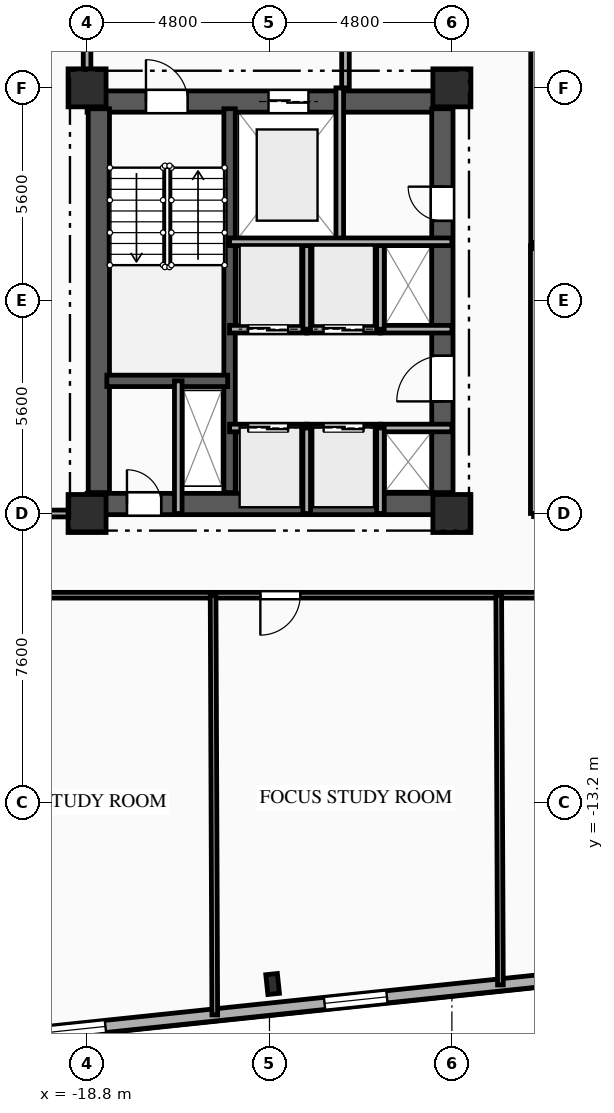
"""IFC4 building model, lengths in metres.
Left out: names, types, materials, properties, quantities, classifications, styles, units other than length and angle.
Written with IfcOpenShell. Run it as: python <this file> out.ifc"""

import sys

from ifc_helpers import new_model, si_unit, direction, frame, frame_2d, origin, origin_2d, place, context, subcontext, project, spatial, rectangle, i_section, extrude, element, fill, save


model = new_model("IFC4")
c1 = context("Model", 3, precision=1e-05, world=origin(), true_north=direction((0.0, 1.0)))
c2 = subcontext(c1, "Body", "Model", "MODEL_VIEW")
j1 = project(units=[si_unit("LENGTHUNIT", "METRE"), si_unit("PLANEANGLEUNIT", "RADIAN")], contexts=[c1])
p1 = place(None, origin())
s1 = spatial("IfcSite", under=j1, at=p1, CompositionType="ELEMENT")
p2 = place(p1, origin())
s2 = spatial("IfcBuilding", under=s1, at=p2, CompositionType="ELEMENT")
p3 = place(p2, frame((0.0, 0.0, 95.75)))
s3 = spatial("IfcBuildingStorey", under=s2, at=p3, CompositionType="ELEMENT", Elevation=95.75)
for number, where, z_axis, x_axis in (
    (1, (-18.8, -5.6, 0.0), (0.0, 0.0, 1.0), (1.0, 0.0, 0.0)),
    (2, (-18.8, 5.6, 0.0), (0.0, 0.0, 1.0), (1.0, 0.0, 0.0)),
    (3, (-9.2, -5.6, 0.0), (0.0, 0.0, 1.0), (1.0, 0.0, 0.0)),
    (4, (-9.2, 5.6, 0.0), (0.0, 0.0, 1.0), (1.0, 0.0, 0.0)),
):
    element("IfcColumn", number, at=place(p3, frame(where, z_axis=z_axis, x_axis=x_axis)), inside=s3, PredefinedType="COLUMN", context=c2, shape_type="SweptSolid", body=[
        extrude(rectangle(XDim=1.0, YDim=1.0, at=origin_2d()), origin(), (0.0, 0.0, 1.0), 3.35),
    ])
p4 = place(p3, frame((-13.917, -17.98, 0.0), z_axis=(0.0, 0.0, 1.0), x_axis=(0.994521895368, 0.104528463268, 0.0)))
e5 = element("IfcColumn", 5, at=p4, inside=s3, PredefinedType="COLUMN", context=c2, shape_type="SweptSolid", body=[
    extrude(i_section(OverallWidth=0.306, OverallDepth=0.524, WebThickness=0.021, FlangeThickness=0.04, FilletRadius=0.027, at=origin_2d()), origin(), (0.0, 0.0, 1.0), 3.35),
])
p5 = place(p3, frame((-2.015, -17.383, 0.0), z_axis=(0.0, 0.0, 1.0), x_axis=(-0.994521393935, -0.104533233979, 0.0)))
e6 = element("IfcWall", 6, at=p5, inside=s3, PredefinedType="SOLIDWALL", context=c2, shape_type="SweptSolid", body=[
    extrude(rectangle(XDim=21.3, YDim=0.32, at=frame_2d((10.65, 0.0))), origin(), (0.0, 0.0, 1.0), 3.045),
])
p6 = place(p5, frame((1.953, 0.0, 0.85)))
e7 = element("IfcOpeningElement", 7, at=p6, cuts=e6, PredefinedType="OPENING", context=c2, shape_type="SweptSolid", body=[
    extrude(rectangle(XDim=2.4, YDim=1.95, at=frame_2d((1.2, 0.975))), frame((0.0, 0.17, 0.0), z_axis=(0.0, -1.0, 0.0), x_axis=(1.0, 0.0, 0.0)), (0.0, 0.0, 1.0), 0.34),
])
p7 = place(p5, frame((8.944, 0.0, 0.85)))
e8 = element("IfcOpeningElement", 8, at=p7, cuts=e6, PredefinedType="OPENING", context=c2, shape_type="SweptSolid", body=[
    extrude(rectangle(XDim=1.65, YDim=1.85, at=frame_2d((0.825, 0.925))), frame((0.0, 0.17, 0.0), z_axis=(0.0, -1.0, 0.0), x_axis=(1.0, 0.0, 0.0)), (0.0, 0.0, 1.0), 0.34),
])
p8 = place(p5, frame((16.391, 0.0, 0.85)))
e9 = element("IfcOpeningElement", 9, at=p8, cuts=e6, PredefinedType="OPENING", context=c2, shape_type="SweptSolid", body=[
    extrude(rectangle(XDim=1.65, YDim=1.85, at=frame_2d((0.825, 0.925))), frame((0.0, 0.17, 0.0), z_axis=(0.0, -1.0, 0.0), x_axis=(1.0, 0.0, 0.0)), (0.0, 0.0, 1.0), 0.34),
])
p9 = place(p3, frame((-18.8, 5.24, 0.0), z_axis=(0.0, 0.0, 1.0), x_axis=(1.0, 0.0, 0.0)))
e10 = element("IfcWall", 10, at=p9, inside=s3, PredefinedType="SHEAR", context=c2, shape_type="SweptSolid", body=[
    extrude(rectangle(XDim=9.6, YDim=0.56, at=frame_2d((4.8, 0.0))), origin(), (0.0, 0.0, 1.0), 3.045),
])
p10 = place(p9, frame((1.55, 0.0, 0.0)))
e11 = element("IfcOpeningElement", 11, at=p10, cuts=e10, PredefinedType="OPENING", context=c2, shape_type="SweptSolid", body=[
    extrude(rectangle(XDim=1.1, YDim=2.15, at=frame_2d((0.55, 1.075))), frame((0.0, 0.29, 0.0), z_axis=(0.0, -1.0, 0.0), x_axis=(1.0, 0.0, 0.0)), (0.0, 0.0, 1.0), 0.58),
])
p11 = place(p9, frame((4.775, 0.0, 0.0)))
e12 = element("IfcOpeningElement", 12, at=p11, cuts=e10, PredefinedType="OPENING", context=c2, shape_type="SweptSolid", body=[
    extrude(rectangle(XDim=1.05, YDim=2.1, at=frame_2d((0.525, 1.05))), frame((0.0, 0.29, 0.0), z_axis=(0.0, -1.0, 0.0), x_axis=(1.0, 0.0, 0.0)), (0.0, 0.0, 1.0), 0.58),
])
p12 = place(p3, frame((-18.8, -5.35, 0.0), z_axis=(0.0, 0.0, 1.0), x_axis=(1.0, 0.0, 0.0)))
e13 = element("IfcWall", 13, at=p12, inside=s3, PredefinedType="SHEAR", context=c2, shape_type="SweptSolid", body=[
    extrude(rectangle(XDim=9.6, YDim=0.56, at=frame_2d((4.8, 0.0))), origin(), (0.0, 0.0, 1.0), 3.045),
])
p13 = place(p12, frame((1.05, 0.0, 0.0)))
e14 = element("IfcOpeningElement", 14, at=p13, cuts=e13, PredefinedType="OPENING", context=c2, shape_type="SweptSolid", body=[
    extrude(rectangle(XDim=0.9, YDim=2.1, at=frame_2d((0.45, 1.05))), frame((0.0, 0.29, 0.0), z_axis=(0.0, -1.0, 0.0), x_axis=(1.0, 0.0, 0.0)), (0.0, 0.0, 1.0), 0.58),
])
p14 = place(p3, frame((-18.49, -5.05, 0.0), z_axis=(0.0, 0.0, 1.0), x_axis=(0.0, 1.0, 0.0)))
e15 = element("IfcWall", 15, at=p14, inside=s3, PredefinedType="SHEAR", context=c2, shape_type="SweptSolid", body=[
    extrude(rectangle(XDim=10.1, YDim=0.56, at=frame_2d((5.05, 0.0))), origin(), (0.0, 0.0, 1.0), 3.045),
])
p15 = place(p3, frame((-9.45, -5.05, 0.0), z_axis=(0.0, 0.0, 1.0), x_axis=(0.0, 1.0, 0.0)))
e16 = element("IfcWall", 16, at=p15, inside=s3, PredefinedType="SHEAR", context=c2, shape_type="SweptSolid", body=[
    extrude(rectangle(XDim=10.1, YDim=0.56, at=frame_2d((5.05, 0.0))), origin(), (0.0, 0.0, 1.0), 3.045),
])
p16 = place(p15, frame((7.15, 0.0, 0.0)))
e17 = element("IfcOpeningElement", 17, at=p16, cuts=e16, PredefinedType="OPENING", context=c2, shape_type="SweptSolid", body=[
    extrude(rectangle(XDim=0.9, YDim=2.1, at=frame_2d((0.45, 1.05))), frame((0.0, 0.29, 0.0), z_axis=(0.0, -1.0, 0.0), x_axis=(1.0, 0.0, 0.0)), (0.0, 0.0, 1.0), 0.58),
])
p17 = place(p15, frame((2.4, 0.0, 0.0)))
e18 = element("IfcOpeningElement", 18, at=p17, cuts=e16, PredefinedType="OPENING", context=c2, shape_type="SweptSolid", body=[
    extrude(rectangle(XDim=1.2, YDim=2.15, at=frame_2d((0.6, 1.075))), frame((0.0, 0.29, 0.0), z_axis=(0.0, -1.0, 0.0), x_axis=(1.0, 0.0, 0.0)), (0.0, 0.0, 1.0), 0.58),
])
p18 = place(p3, frame((-15.05, -5.05, 0.0), z_axis=(0.0, 0.0, 1.0), x_axis=(0.0, 1.0, 0.0)))
e19 = element("IfcWall", 19, at=p18, inside=s3, PredefinedType="SHEAR", context=c2, shape_type="SweptSolid", body=[
    extrude(rectangle(XDim=10.1, YDim=0.3, at=frame_2d((5.05, 0.0))), origin(), (0.0, 0.0, 1.0), 3.045),
])
p19 = place(p3, frame((-18.28, -2.11, 0.0), z_axis=(0.0, 0.0, 1.0), x_axis=(1.0, 0.0, 0.0)))
e20 = element("IfcWall", 20, at=p19, inside=s3, PredefinedType="SHEAR", context=c2, shape_type="SweptSolid", body=[
    extrude(rectangle(XDim=3.18, YDim=0.3, at=frame_2d((1.59, 0.0))), origin(), (0.0, 0.0, 1.0), 3.045),
])
p20 = place(p3, frame((-16.4, -5.6, 0.0), z_axis=(0.0, 0.0, 1.0), x_axis=(0.0, 1.0, 0.0)))
e21 = element("IfcWall", 21, at=p20, inside=s3, PredefinedType="PARTITIONING", context=c2, shape_type="SweptSolid", body=[
    extrude(rectangle(XDim=3.49, YDim=0.2, at=frame_2d((1.745, 0.0))), origin(), (0.0, 0.0, 1.0), 3.045),
])
p21 = place(p3, frame((-12.15, 1.55, 0.0), z_axis=(0.0, 0.0, 1.0), x_axis=(0.0, 1.0, 0.0)))
e22 = element("IfcWall", 22, at=p21, inside=s3, PredefinedType="PARTITIONING", context=c2, shape_type="SweptSolid", body=[
    extrude(rectangle(XDim=4.05, YDim=0.2, at=frame_2d((2.025, 0.0))), origin(), (0.0, 0.0, 1.0), 3.045),
])
p22 = place(p3, frame((-12.0, 5.6, 0.0), z_axis=(0.0, 0.0, 1.0), x_axis=(0.0, 1.0, 0.0)))
e23 = element("IfcWall", 23, at=p22, inside=s3, PredefinedType="PARTITIONING", context=c2, shape_type="SweptSolid", body=[
    extrude(rectangle(XDim=2.9, YDim=0.2, at=frame_2d((1.45, 0.0))), origin(), (0.0, 0.0, 1.0), 3.045),
])
p23 = place(p3, frame((-18.8, 8.5, 0.0), z_axis=(0.0, 0.0, 1.0), x_axis=(0.0, -1.0, 0.0)))
e24 = element("IfcWall", 24, at=p23, inside=s3, PredefinedType="PARTITIONING", context=c2, shape_type="SweptSolid", body=[
    extrude(rectangle(XDim=2.9, YDim=0.2, at=frame_2d((1.45, 0.0))), origin(), (0.0, 0.0, 1.0), 2.53),
])
p24 = place(p3, frame((-15.05, -3.35, 0.0), z_axis=(0.0, 0.0, 1.0), x_axis=(1.0, 0.0, 0.0)))
e25 = element("IfcWall", 25, at=p24, inside=s3, PredefinedType="PARTITIONING", context=c2, shape_type="SweptSolid", body=[
    extrude(rectangle(XDim=2.03, YDim=0.2, at=frame_2d((1.015, 0.0))), origin(), (0.0, 0.0, 1.0), 3.045),
])
p25 = place(p24, frame((0.49, 0.0, 0.0)))
e26 = element("IfcOpeningElement", 26, at=p25, cuts=e25, PredefinedType="OPENING", context=c2, shape_type="SweptSolid", body=[
    extrude(rectangle(XDim=1.05, YDim=2.1, at=frame_2d((0.525, 1.05))), frame((0.0, 0.11, 0.0), z_axis=(0.0, -1.0, 0.0), x_axis=(1.0, 0.0, 0.0)), (0.0, 0.0, 1.0), 0.22),
])
p26 = place(p3, frame((-13.02, -3.35, 0.0), z_axis=(0.0, 0.0, 1.0), x_axis=(1.0, 0.0, 0.0)))
e27 = element("IfcWall", 27, at=p26, inside=s3, PredefinedType="PARTITIONING", context=c2, shape_type="SweptSolid", body=[
    extrude(rectangle(XDim=1.94, YDim=0.2, at=frame_2d((0.97, 0.0))), origin(), (0.0, 0.0, 1.0), 3.045),
])
p27 = place(p26, frame((0.445, 0.0, 0.0)))
e28 = element("IfcOpeningElement", 28, at=p27, cuts=e27, PredefinedType="OPENING", context=c2, shape_type="SweptSolid", body=[
    extrude(rectangle(XDim=1.05, YDim=2.1, at=frame_2d((0.525, 1.05))), frame((0.0, 0.11, 0.0), z_axis=(0.0, -1.0, 0.0), x_axis=(1.0, 0.0, 0.0)), (0.0, 0.0, 1.0), 0.22),
])
p28 = place(p3, frame((-11.08, -3.35, 0.0), z_axis=(0.0, 0.0, 1.0), x_axis=(1.0, 0.0, 0.0)))
e29 = element("IfcWall", 29, at=p28, inside=s3, PredefinedType="PARTITIONING", context=c2, shape_type="SweptSolid", body=[
    extrude(rectangle(XDim=1.88, YDim=0.2, at=frame_2d((0.94, 0.0))), origin(), (0.0, 0.0, 1.0), 2.76),
])
p29 = place(p3, frame((-13.02, -0.75, 0.0), z_axis=(0.0, 0.0, 1.0), x_axis=(-1.0, 0.0, 0.0)))
e30 = element("IfcWall", 30, at=p29, inside=s3, PredefinedType="PARTITIONING", context=c2, shape_type="SweptSolid", body=[
    extrude(rectangle(XDim=2.03, YDim=0.2, at=frame_2d((1.015, 0.0))), origin(), (0.0, 0.0, 1.0), 3.045),
])
p30 = place(p29, frame((0.49, 0.0, 0.0)))
e31 = element("IfcOpeningElement", 31, at=p30, cuts=e30, PredefinedType="OPENING", context=c2, shape_type="SweptSolid", body=[
    extrude(rectangle(XDim=1.05, YDim=2.1, at=frame_2d((0.525, 1.05))), frame((0.0, 0.11, 0.0), z_axis=(0.0, -1.0, 0.0), x_axis=(1.0, 0.0, 0.0)), (0.0, 0.0, 1.0), 0.22),
])
p31 = place(p3, frame((-11.08, -0.75, 0.0), z_axis=(0.0, 0.0, 1.0), x_axis=(-1.0, 0.0, 0.0)))
e32 = element("IfcWall", 32, at=p31, inside=s3, PredefinedType="PARTITIONING", context=c2, shape_type="SweptSolid", body=[
    extrude(rectangle(XDim=1.94, YDim=0.2, at=frame_2d((0.97, 0.0))), origin(), (0.0, 0.0, 1.0), 3.045),
])
p32 = place(p31, frame((0.445, 0.0, 0.0)))
e33 = element("IfcOpeningElement", 33, at=p32, cuts=e32, PredefinedType="OPENING", context=c2, shape_type="SweptSolid", body=[
    extrude(rectangle(XDim=1.05, YDim=2.1, at=frame_2d((0.525, 1.05))), frame((0.0, 0.11, 0.0), z_axis=(0.0, -1.0, 0.0), x_axis=(1.0, 0.0, 0.0)), (0.0, 0.0, 1.0), 0.22),
])
p33 = place(p3, frame((-9.2, -0.75, 0.0), z_axis=(0.0, 0.0, 1.0), x_axis=(-1.0, 0.0, 0.0)))
e34 = element("IfcWall", 34, at=p33, inside=s3, PredefinedType="PARTITIONING", context=c2, shape_type="SweptSolid", body=[
    extrude(rectangle(XDim=1.88, YDim=0.2, at=frame_2d((0.94, 0.0))), origin(), (0.0, 0.0, 1.0), 3.045),
])
for number, where, z_axis, x_axis in (
    (35, (-13.02, -5.6, 0.0), (0.0, 0.0, 1.0), (0.0, 1.0, 0.0)),
    (36, (-11.08, -5.6, 0.0), (0.0, 0.0, 1.0), (0.0, 1.0, 0.0)),
):
    element("IfcWall", number, at=place(p3, frame(where, z_axis=z_axis, x_axis=x_axis)), inside=s3, PredefinedType="PARTITIONING", context=c2, shape_type="SweptSolid", body=[
        extrude(rectangle(XDim=2.25, YDim=0.2, at=frame_2d((1.125, 0.0))), origin(), (0.0, 0.0, 1.0), 3.045),
    ])
for number, where, z_axis, x_axis in (
    (37, (-13.02, -0.75, 0.0), (0.0, 0.0, 1.0), (0.0, 1.0, 0.0)),
    (38, (-11.08, -0.75, 0.0), (0.0, 0.0, 1.0), (0.0, 1.0, 0.0)),
):
    element("IfcWall", number, at=place(p3, frame(where, z_axis=z_axis, x_axis=x_axis)), inside=s3, PredefinedType="PARTITIONING", context=c2, shape_type="SweptSolid", body=[
        extrude(rectangle(XDim=2.3, YDim=0.2, at=frame_2d((1.15, 0.0))), origin(), (0.0, 0.0, 1.0), 3.045),
    ])
p34 = place(p3, frame((-21.45, -5.6, 0.0), z_axis=(0.0, 0.0, 1.0), x_axis=(1.0, 0.0, 0.0)))
e39 = element("IfcWall", 39, at=p34, inside=s3, PredefinedType="PARTITIONING", context=c2, shape_type="SweptSolid", body=[
    extrude(rectangle(XDim=2.65, YDim=0.18, at=frame_2d((1.325, 0.0))), origin(), (0.0, 0.0, 1.0), 3.045),
])
p35 = place(p3, frame((-15.483, -7.75, 0.0), z_axis=(0.0, 0.0, 1.0), x_axis=(-1.0, 0.0, 0.0)))
e40 = element("IfcWall", 40, at=p35, inside=s3, PredefinedType="PARTITIONING", context=c2, shape_type="SweptSolid", body=[
    extrude(rectangle(XDim=7.517, YDim=0.15, at=frame_2d((3.758, 0.0))), origin(), (0.0, 0.0, 1.0), 3.045),
])
p36 = place(p35, frame((5.223, 0.0, 0.0)))
e41 = element("IfcOpeningElement", 41, at=p36, cuts=e40, PredefinedType="OPENING", context=c2, shape_type="SweptSolid", body=[
    extrude(rectangle(XDim=1.05, YDim=2.15, at=frame_2d((0.525, 1.075))), frame((0.0, 0.085, 0.0), z_axis=(0.0, -1.0, 0.0), x_axis=(1.0, 0.0, 0.0)), (0.0, 0.0, 1.0), 0.17),
])
p37 = place(p3, frame((-7.967, -7.75, 0.0), z_axis=(0.0, 0.0, 1.0), x_axis=(-1.0, 0.0, 0.0)))
e42 = element("IfcWall", 42, at=p37, inside=s3, PredefinedType="PARTITIONING", context=c2, shape_type="SweptSolid", body=[
    extrude(rectangle(XDim=7.516, YDim=0.15, at=frame_2d((3.758, 0.0))), origin(), (0.0, 0.0, 1.0), 3.045),
])
p38 = place(p37, frame((5.223, 0.0, 0.0)))
e43 = element("IfcOpeningElement", 43, at=p38, cuts=e42, PredefinedType="OPENING", context=c2, shape_type="SweptSolid", body=[
    extrude(rectangle(XDim=1.05, YDim=2.15, at=frame_2d((0.525, 1.075))), frame((0.0, 0.085, 0.0), z_axis=(0.0, -1.0, 0.0), x_axis=(1.0, 0.0, 0.0)), (0.0, 0.0, 1.0), 0.17),
])
p39 = place(p3, frame((0.0, -7.75, 0.0), z_axis=(0.0, 0.0, 1.0), x_axis=(-1.0, 0.0, 0.0)))
e44 = element("IfcWall", 44, at=p39, inside=s3, PredefinedType="PARTITIONING", context=c2, shape_type="SweptSolid", body=[
    extrude(rectangle(XDim=7.967, YDim=0.15, at=frame_2d((3.983, 0.0))), origin(), (0.0, 0.0, 1.0), 3.045),
])
p40 = place(p39, frame((1.3, 0.0, 0.0)))
e45 = element("IfcOpeningElement", 45, at=p40, cuts=e44, PredefinedType="OPENING", context=c2, shape_type="SweptSolid", body=[
    extrude(rectangle(XDim=1.05, YDim=2.15, at=frame_2d((0.525, 1.075))), frame((0.0, 0.085, 0.0), z_axis=(0.0, -1.0, 0.0), x_axis=(1.0, 0.0, 0.0)), (0.0, 0.0, 1.0), 0.17),
])
p41 = place(p3, frame((-7.05, -5.6, 0.0), z_axis=(0.0, 0.0, 1.0), x_axis=(1.0, 0.0, 0.0)))
e46 = element("IfcWall", 46, at=p41, inside=s3, PredefinedType="PARTITIONING", context=c2, shape_type="SweptSolid", body=[
    extrude(rectangle(XDim=7.05, YDim=0.165, at=frame_2d((3.525, 0.0))), origin(), (0.0, 0.0, 1.0), 2.53),
])
p42 = place(p41, frame((4.728, 0.0, 0.0)))
e47 = element("IfcOpeningElement", 47, at=p42, cuts=e46, PredefinedType="OPENING", context=c2, shape_type="SweptSolid", body=[
    extrude(rectangle(XDim=1.15, YDim=2.15, at=frame_2d((0.575, 1.075))), frame((0.0, 0.093, 0.0), z_axis=(0.0, -1.0, 0.0), x_axis=(1.0, 0.0, 0.0)), (0.0, 0.0, 1.0), 0.185),
])
p43 = place(p3, frame((-7.05, 1.45, 0.0), z_axis=(0.0, 0.0, 1.0), x_axis=(0.0, -1.0, 0.0)))
e48 = element("IfcWall", 48, at=p43, inside=s3, PredefinedType="PARTITIONING", context=c2, shape_type="SweptSolid", body=[
    extrude(rectangle(XDim=7.05, YDim=0.165, at=frame_2d((3.525, 0.0))), origin(), (0.0, 0.0, 1.0), 3.045),
])
p44 = place(p3, frame((-7.05, 8.5, 0.0), z_axis=(0.0, 0.0, 1.0), x_axis=(0.0, -1.0, 0.0)))
e49 = element("IfcWall", 49, at=p44, inside=s3, PredefinedType="PARTITIONING", context=c2, shape_type="SweptSolid", body=[
    extrude(rectangle(XDim=7.05, YDim=0.15, at=frame_2d((3.525, 0.0))), origin(), (0.0, 0.0, 1.0), 3.045),
])
p45 = place(p3, frame((-15.483, -7.75, 0.0), z_axis=(0.0, 0.0, 1.0), x_axis=(0.003956994399, -0.999992171067, 0.0)))
e50 = element("IfcWall", 50, at=p45, inside=s3, PredefinedType="PARTITIONING", context=c2, shape_type="SweptSolid", body=[
    extrude(rectangle(XDim=11.044, YDim=0.15, at=frame_2d((5.522, 0.0))), origin(), (0.0, 0.0, 1.0), 3.045),
])
p46 = place(p3, frame((-7.967, -7.75, 0.0), z_axis=(0.0, 0.0, 1.0), x_axis=(0.004285674928, -0.999990816453, 0.0)))
e51 = element("IfcWall", 51, at=p46, inside=s3, PredefinedType="PARTITIONING", context=c2, shape_type="SweptSolid", body=[
    extrude(rectangle(XDim=10.254, YDim=0.15, at=frame_2d((5.127, 0.0))), origin(), (0.0, 0.0, 1.0), 3.045),
])
p47 = place(p3, frame((-7.05, 1.45, 0.0), z_axis=(0.0, 0.0, 1.0), x_axis=(1.0, 0.0, 0.0)))
e52 = element("IfcWall", 52, at=p47, inside=s3, PredefinedType="PARTITIONING", context=c2, shape_type="SweptSolid", body=[
    extrude(rectangle(XDim=14.1, YDim=0.165, at=frame_2d((7.05, 0.0))), origin(), (0.0, 0.0, 1.0), 3.045),
])
p48 = place(p3, frame((-15.05, 1.55, 0.0), z_axis=(0.0, 0.0, 1.0), x_axis=(1.0, 0.0, 0.0)))
e53 = element("IfcWall", 53, at=p48, inside=s3, PredefinedType="PARTITIONING", context=c2, shape_type="SweptSolid", body=[
    extrude(rectangle(XDim=5.85, YDim=0.2, at=frame_2d((2.925, 0.0))), origin(), (0.0, 0.0, 1.0), 3.045),
])
p49 = place(p7, origin())
e54 = element("IfcWindow", 54, at=p49, inside=s3, PartitioningType="SINGLE_PANEL", PredefinedType="WINDOW", context=c2, shape_type="SweptSolid", body=[
    extrude(rectangle(XDim=1.65, YDim=1.85, at=frame_2d((0.825, 0.925))), frame((0.0, 0.03, 0.0), z_axis=(0.0, -1.0, 0.0), x_axis=(1.0, 0.0, 0.0)), (0.0, 0.0, 1.0), 0.06),
])
fill(e8, e54)
p50 = place(p8, origin())
e55 = element("IfcWindow", 55, at=p50, inside=s3, PartitioningType="SINGLE_PANEL", PredefinedType="WINDOW", context=c2, shape_type="SweptSolid", body=[
    extrude(rectangle(XDim=1.65, YDim=1.85, at=frame_2d((0.825, 0.925))), frame((0.0, 0.03, 0.0), z_axis=(0.0, -1.0, 0.0), x_axis=(1.0, 0.0, 0.0)), (0.0, 0.0, 1.0), 0.06),
])
fill(e9, e55)
p51 = place(p10, origin())
e56 = element("IfcDoor", 56, at=p51, inside=s3, OperationType="SINGLE_SWING_LEFT", PredefinedType="DOOR", context=c2, shape_type="SweptSolid", body=[
    extrude(rectangle(XDim=1.1, YDim=2.15, at=frame_2d((0.55, 1.075))), frame((0.0, 0.025, 0.0), z_axis=(0.0, -1.0, 0.0), x_axis=(1.0, 0.0, 0.0)), (0.0, 0.0, 1.0), 0.05),
])
fill(e11, e56)
p52 = place(p11, origin())
e57 = element("IfcDoor", 57, at=p52, inside=s3, OperationType="DOUBLE_DOOR_SLIDING", PredefinedType="DOOR", context=c2, shape_type="SweptSolid", body=[
    extrude(rectangle(XDim=1.05, YDim=2.1, at=frame_2d((0.525, 1.05))), frame((0.0, 0.025, 0.0), z_axis=(0.0, -1.0, 0.0), x_axis=(1.0, 0.0, 0.0)), (0.0, 0.0, 1.0), 0.05),
])
fill(e12, e57)
p53 = place(p13, origin())
e58 = element("IfcDoor", 58, at=p53, inside=s3, OperationType="SINGLE_SWING_LEFT", PredefinedType="DOOR", context=c2, shape_type="SweptSolid", body=[
    extrude(rectangle(XDim=0.9, YDim=2.1, at=frame_2d((0.45, 1.05))), frame((0.0, 0.025, 0.0), z_axis=(0.0, -1.0, 0.0), x_axis=(1.0, 0.0, 0.0)), (0.0, 0.0, 1.0), 0.05),
])
fill(e14, e58)
p54 = place(p16, origin())
e59 = element("IfcDoor", 59, at=p54, inside=s3, OperationType="SINGLE_SWING_RIGHT", PredefinedType="DOOR", context=c2, shape_type="SweptSolid", body=[
    extrude(rectangle(XDim=0.9, YDim=2.1, at=frame_2d((0.45, 1.05))), frame((0.0, 0.025, 0.0), z_axis=(0.0, -1.0, 0.0), x_axis=(1.0, 0.0, 0.0)), (0.0, 0.0, 1.0), 0.05),
])
fill(e17, e59)
p55 = place(p25, origin())
e60 = element("IfcDoor", 60, at=p55, inside=s3, OperationType="DOUBLE_DOOR_SLIDING", PredefinedType="DOOR", context=c2, shape_type="SweptSolid", body=[
    extrude(rectangle(XDim=1.05, YDim=2.1, at=frame_2d((0.525, 1.05))), frame((0.0, 0.025, 0.0), z_axis=(0.0, -1.0, 0.0), x_axis=(1.0, 0.0, 0.0)), (0.0, 0.0, 1.0), 0.05),
])
fill(e26, e60)
p56 = place(p27, origin())
e61 = element("IfcDoor", 61, at=p56, inside=s3, OperationType="DOUBLE_DOOR_SLIDING", PredefinedType="DOOR", context=c2, shape_type="SweptSolid", body=[
    extrude(rectangle(XDim=1.05, YDim=2.1, at=frame_2d((0.525, 1.05))), frame((0.0, 0.025, 0.0), z_axis=(0.0, -1.0, 0.0), x_axis=(1.0, 0.0, 0.0)), (0.0, 0.0, 1.0), 0.05),
])
fill(e28, e61)
p57 = place(p30, origin())
e62 = element("IfcDoor", 62, at=p57, inside=s3, OperationType="DOUBLE_DOOR_SLIDING", PredefinedType="DOOR", context=c2, shape_type="SweptSolid", body=[
    extrude(rectangle(XDim=1.05, YDim=2.1, at=frame_2d((0.525, 1.05))), frame((0.0, 0.025, 0.0), z_axis=(0.0, -1.0, 0.0), x_axis=(1.0, 0.0, 0.0)), (0.0, 0.0, 1.0), 0.05),
])
fill(e31, e62)
p58 = place(p32, origin())
e63 = element("IfcDoor", 63, at=p58, inside=s3, OperationType="DOUBLE_DOOR_SLIDING", PredefinedType="DOOR", context=c2, shape_type="SweptSolid", body=[
    extrude(rectangle(XDim=1.05, YDim=2.1, at=frame_2d((0.525, 1.05))), frame((0.0, 0.025, 0.0), z_axis=(0.0, -1.0, 0.0), x_axis=(1.0, 0.0, 0.0)), (0.0, 0.0, 1.0), 0.05),
])
fill(e33, e63)
p59 = place(p17, origin())
e64 = element("IfcDoor", 64, at=p59, inside=s3, OperationType="SINGLE_SWING_LEFT", PredefinedType="DOOR", context=c2, shape_type="SweptSolid", body=[
    extrude(rectangle(XDim=1.2, YDim=2.15, at=frame_2d((0.6, 1.075))), frame((0.0, 0.025, 0.0), z_axis=(0.0, -1.0, 0.0), x_axis=(1.0, 0.0, 0.0)), (0.0, 0.0, 1.0), 0.05),
])
fill(e18, e64)
p60 = place(p38, origin())
e65 = element("IfcDoor", 65, at=p60, inside=s3, OperationType="SINGLE_SWING_RIGHT", PredefinedType="DOOR", context=c2, shape_type="SweptSolid", body=[
    extrude(rectangle(XDim=1.05, YDim=2.15, at=frame_2d((0.525, 1.075))), frame((0.0, 0.025, 0.0), z_axis=(0.0, -1.0, 0.0), x_axis=(1.0, 0.0, 0.0)), (0.0, 0.0, 1.0), 0.05),
])
fill(e43, e65)
save(model, sys.argv[1])
